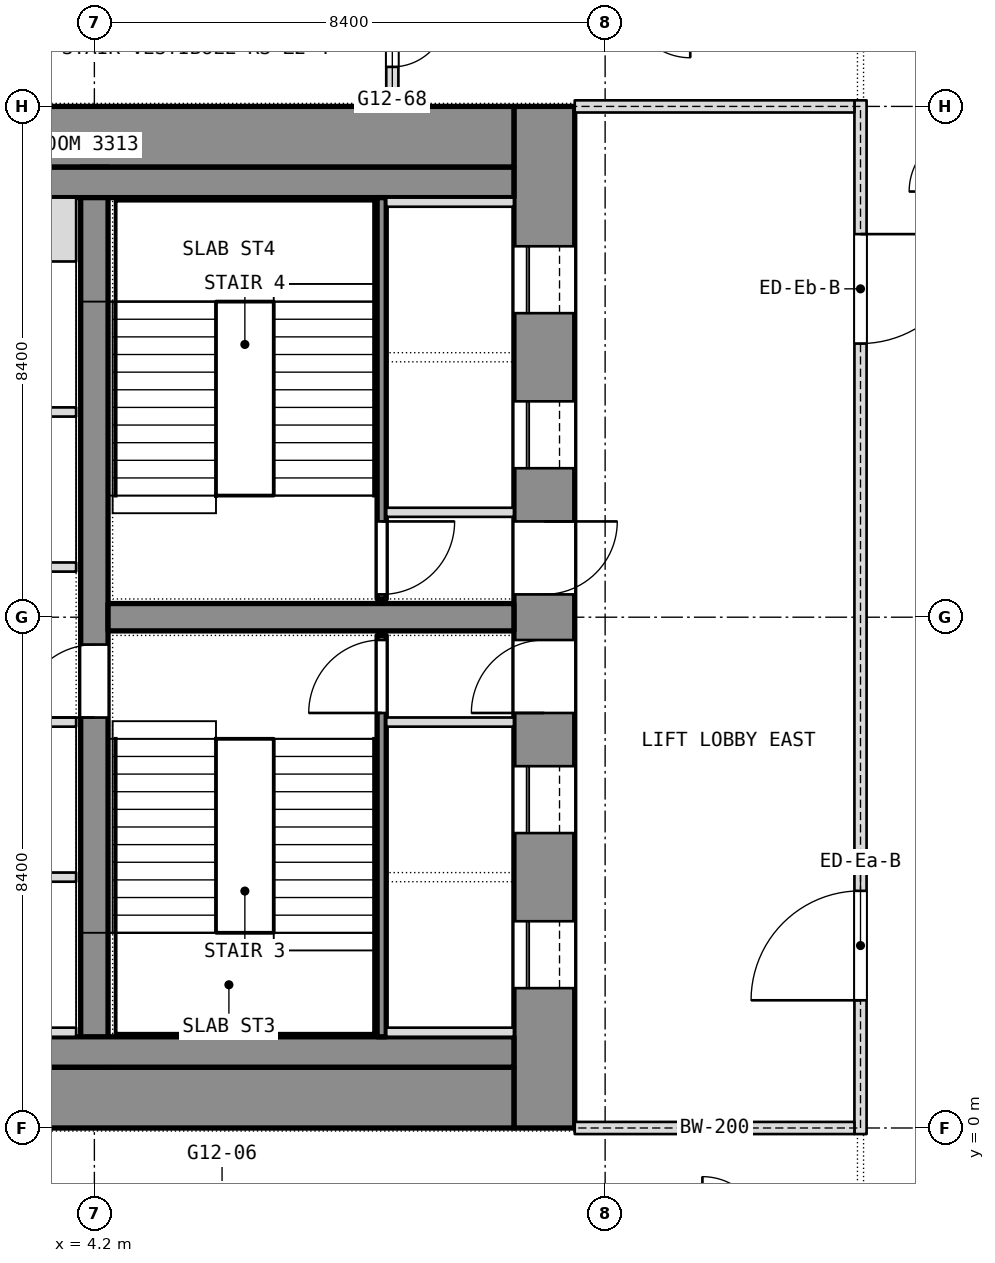
"""IFC4 building model, lengths in metres.
Left out: names, types, materials, properties, quantities, classifications, styles, units other than length and angle.
Written with IfcOpenShell. Run it as: python <this file> out.ifc"""

import sys

from ifc_helpers import new_model, si_unit, direction, frame, frame_2d, origin, place, context, subcontext, project, spatial, rectangle, extrude, element, fill, save


model = new_model("IFC4")
c1 = context("Model", 3, precision=1e-05, world=origin(), true_north=direction((0.0, 1.0)))
c2 = subcontext(c1, "Body", "Model", "MODEL_VIEW")
j1 = project(units=[si_unit("LENGTHUNIT", "METRE"), si_unit("PLANEANGLEUNIT", "RADIAN")], contexts=[c1])
p1 = place(None, origin())
s1 = spatial("IfcSite", under=j1, at=p1, CompositionType="ELEMENT")
p2 = place(p1, origin())
s2 = spatial("IfcBuilding", under=s1, at=p2, CompositionType="ELEMENT")
p3 = place(p2, frame((0.0, 0.0, 144.5)))
s3 = spatial("IfcBuildingStorey", under=s2, at=p3, CompositionType="ELEMENT", Elevation=144.5)
p4 = place(p3, frame((11.6, 0.0, 0.0), z_axis=(0.0, 0.0, 1.0), x_axis=(0.0, 1.0, 0.0)))
e1 = element("IfcWall", 1, at=p4, inside=s3, PredefinedType="SHEAR", context=c2, shape_type="SweptSolid", body=[
    extrude(rectangle(XDim=16.8, YDim=1.0, at=frame_2d((8.4, 0.0))), origin(), (0.0, 0.0, 1.0), 3.6),
])
p5 = place(p4, frame((2.3, 0.0, 0.0)))
e2 = element("IfcOpeningElement", 2, at=p5, cuts=e1, PredefinedType="OPENING", context=c2, shape_type="SweptSolid", body=[
    extrude(rectangle(XDim=1.1, YDim=2.1, at=frame_2d((0.55, 1.05))), frame((0.0, 0.5, 0.0), z_axis=(0.0, -1.0, 0.0), x_axis=(1.0, 0.0, 0.0)), (0.0, 0.0, 1.0), 1.0),
])
p6 = place(p4, frame((4.85, 0.0, 0.0)))
e3 = element("IfcOpeningElement", 3, at=p6, cuts=e1, PredefinedType="OPENING", context=c2, shape_type="SweptSolid", body=[
    extrude(rectangle(XDim=1.1, YDim=2.1, at=frame_2d((0.55, 1.05))), frame((0.0, 0.5, 0.0), z_axis=(0.0, -1.0, 0.0), x_axis=(1.0, 0.0, 0.0)), (0.0, 0.0, 1.0), 1.0),
])
p7 = place(p4, frame((6.825, 0.0, 0.0)))
e4 = element("IfcOpeningElement", 4, at=p7, cuts=e1, PredefinedType="OPENING", context=c2, shape_type="SweptSolid", body=[
    extrude(rectangle(XDim=1.2, YDim=2.1, at=frame_2d((0.6, 1.05))), frame((0.0, 0.5, 0.0), z_axis=(0.0, -1.0, 0.0), x_axis=(1.0, 0.0, 0.0)), (0.0, 0.0, 1.0), 1.0),
])
p8 = place(p4, frame((13.4, 0.0, 0.0)))
e5 = element("IfcOpeningElement", 5, at=p8, cuts=e1, PredefinedType="OPENING", context=c2, shape_type="SweptSolid", body=[
    extrude(rectangle(XDim=1.1, YDim=2.1, at=frame_2d((0.55, 1.05))), frame((0.0, 0.5, 0.0), z_axis=(0.0, -1.0, 0.0), x_axis=(1.0, 0.0, 0.0)), (0.0, 0.0, 1.0), 1.0),
])
p9 = place(p4, frame((10.85, 0.0, 0.0)))
e6 = element("IfcOpeningElement", 6, at=p9, cuts=e1, PredefinedType="OPENING", context=c2, shape_type="SweptSolid", body=[
    extrude(rectangle(XDim=1.1, YDim=2.1, at=frame_2d((0.55, 1.05))), frame((0.0, 0.5, 0.0), z_axis=(0.0, -1.0, 0.0), x_axis=(1.0, 0.0, 0.0)), (0.0, 0.0, 1.0), 1.0),
])
p10 = place(p4, frame((8.775, 0.0, 0.0)))
e7 = element("IfcOpeningElement", 7, at=p10, cuts=e1, PredefinedType="OPENING", context=c2, shape_type="SweptSolid", body=[
    extrude(rectangle(XDim=1.2, YDim=2.1, at=frame_2d((0.6, 1.05))), frame((0.0, 0.5, 0.0), z_axis=(0.0, -1.0, 0.0), x_axis=(1.0, 0.0, 0.0)), (0.0, 0.0, 1.0), 1.0),
])
for number, where, z_axis, x_axis in (
    (8, (-11.1, 0.5, 0.0), (0.0, 0.0, 1.0), (1.0, 0.0, 0.0)),
    (9, (-11.1, 16.3, 0.0), (0.0, 0.0, 1.0), (1.0, 0.0, 0.0)),
):
    element("IfcWall", number, at=place(p3, frame(where, z_axis=z_axis, x_axis=x_axis)), inside=s3, PredefinedType="SHEAR", context=c2, shape_type="SweptSolid", body=[
        extrude(rectangle(XDim=22.2, YDim=1.0, at=frame_2d((11.1, 0.0))), origin(), (0.0, 0.0, 1.0), 3.6),
    ])
p11 = place(p3, frame((4.2, 1.0, 0.0), z_axis=(0.0, 0.0, 1.0), x_axis=(0.0, 1.0, 0.0)))
e10 = element("IfcWall", 10, at=p11, inside=s3, PredefinedType="SHEAR", context=c2, shape_type="SweptSolid", body=[
    extrude(rectangle(XDim=14.8, YDim=0.45, at=frame_2d((7.4, 0.0))), origin(), (0.0, 0.0, 1.0), 3.6),
])
p12 = place(p11, frame((5.75, 0.0, 0.0)))
e11 = element("IfcOpeningElement", 11, at=p12, cuts=e10, PredefinedType="OPENING", context=c2, shape_type="SweptSolid", body=[
    extrude(rectangle(XDim=1.2, YDim=2.1, at=frame_2d((0.6, 1.05))), frame((0.0, 0.225, 0.0), z_axis=(0.0, -1.0, 0.0), x_axis=(1.0, 0.0, 0.0)), (0.0, 0.0, 1.0), 0.45),
])
p13 = place(p3, frame((4.425, 8.4, 0.0), z_axis=(0.0, 0.0, 1.0), x_axis=(1.0, 0.0, 0.0)))
e12 = element("IfcWall", 12, at=p13, inside=s3, PredefinedType="SHEAR", context=c2, shape_type="SweptSolid", body=[
    extrude(rectangle(XDim=6.675, YDim=0.45, at=frame_2d((3.337, 0.0))), origin(), (0.0, 0.0, 1.0), 3.6),
])
p14 = place(p3, frame((9.1, 16.9, 0.0), z_axis=(0.0, 0.0, 1.0), x_axis=(0.0, 1.0, 0.0)))
e13 = element("IfcWall", 13, at=p14, inside=s3, PredefinedType="PARTITIONING", context=c2, shape_type="SweptSolid", body=[
    extrude(rectangle(XDim=1.8, YDim=0.2, at=frame_2d((0.9, 0.0))), origin(), (0.0, 0.0, 1.0), 3.34),
])
p15 = place(p14, frame((0.55, 0.0, 0.0)))
e14 = element("IfcOpeningElement", 14, at=p15, cuts=e13, PredefinedType="OPENING", context=c2, shape_type="SweptSolid", body=[
    extrude(rectangle(XDim=0.9, YDim=2.1, at=frame_2d((0.45, 1.05))), frame((0.0, 0.1, 0.0), z_axis=(0.0, -1.0, 0.0), x_axis=(1.0, 0.0, 0.0)), (0.0, 0.0, 1.0), 0.2),
])
for number, where, z_axis, x_axis in (
    (15, (-11.1, 1.25, 0.0), (0.0, 0.0, 1.0), (1.0, 0.0, 0.0)),
    (16, (-11.1, 15.55, 0.0), (0.0, 0.0, 1.0), (1.0, 0.0, 0.0)),
):
    element("IfcWall", number, at=place(p3, frame(where, z_axis=z_axis, x_axis=x_axis)), inside=s3, PredefinedType="PARTITIONING", context=c2, shape_type="SweptSolid", body=[
        extrude(rectangle(XDim=22.2, YDim=0.5, at=frame_2d((11.1, 0.0))), origin(), (0.0, 0.0, 1.0), 3.34),
    ])
p16 = place(p3, frame((8.925, 1.5, 0.0), z_axis=(0.0, 0.0, 1.0), x_axis=(0.0, 1.0, 0.0)))
e17 = element("IfcWall", 17, at=p16, inside=s3, PredefinedType="SHEAR", context=c2, shape_type="SweptSolid", body=[
    extrude(rectangle(XDim=6.6, YDim=0.15, at=frame_2d((3.3, 0.0))), origin(), (0.0, 0.0, 1.0), 3.34),
])
p17 = place(p16, frame((5.325, 0.0, 0.0)))
e18 = element("IfcOpeningElement", 18, at=p17, cuts=e17, PredefinedType="OPENING", context=c2, shape_type="SweptSolid", body=[
    extrude(rectangle(XDim=1.2, YDim=2.1, at=frame_2d((0.6, 1.05))), frame((0.0, 0.075, 0.0), z_axis=(0.0, -1.0, 0.0), x_axis=(1.0, 0.0, 0.0)), (0.0, 0.0, 1.0), 0.15),
])
for number, where, z_axis, x_axis in (
    (19, (9.0, 6.675, 0.0), (0.0, 0.0, 1.0), (1.0, 0.0, 0.0)),
    (20, (9.0, 1.575, 0.0), (0.0, 0.0, 1.0), (1.0, 0.0, 0.0)),
):
    element("IfcWall", number, at=place(p3, frame(where, z_axis=z_axis, x_axis=x_axis)), inside=s3, PredefinedType="SHEAR", context=c2, shape_type="SweptSolid", body=[
        extrude(rectangle(XDim=2.1, YDim=0.15, at=frame_2d((1.05, 0.0))), origin(), (0.0, 0.0, 1.0), 3.6),
    ])
p18 = place(p3, frame((8.925, 8.7, 0.0), z_axis=(0.0, 0.0, 1.0), x_axis=(0.0, 1.0, 0.0)))
e21 = element("IfcWall", 21, at=p18, inside=s3, PredefinedType="SHEAR", context=c2, shape_type="SweptSolid", body=[
    extrude(rectangle(XDim=6.6, YDim=0.15, at=frame_2d((3.3, 0.0))), origin(), (0.0, 0.0, 1.0), 3.34),
])
p19 = place(p18, frame((0.075, 0.0, 0.0)))
e22 = element("IfcOpeningElement", 22, at=p19, cuts=e21, PredefinedType="OPENING", context=c2, shape_type="SweptSolid", body=[
    extrude(rectangle(XDim=1.2, YDim=2.1, at=frame_2d((0.6, 1.05))), frame((0.0, 0.075, 0.0), z_axis=(0.0, -1.0, 0.0), x_axis=(1.0, 0.0, 0.0)), (0.0, 0.0, 1.0), 0.15),
])
for number, where, z_axis, x_axis in (
    (23, (9.0, 10.125, 0.0), (0.0, 0.0, 1.0), (1.0, 0.0, 0.0)),
    (24, (9.0, 15.225, 0.0), (0.0, 0.0, 1.0), (1.0, 0.0, 0.0)),
):
    element("IfcWall", number, at=place(p3, frame(where, z_axis=z_axis, x_axis=x_axis)), inside=s3, PredefinedType="SHEAR", context=c2, shape_type="SweptSolid", body=[
        extrude(rectangle(XDim=2.1, YDim=0.15, at=frame_2d((1.05, 0.0))), origin(), (0.0, 0.0, 1.0), 3.6),
    ])
p20 = place(p3, frame((-3.9, 4.125, 0.0), z_axis=(0.0, 0.0, 1.0), x_axis=(1.0, 0.0, 0.0)))
e25 = element("IfcWall", 25, at=p20, inside=s3, PredefinedType="PARTITIONING", context=c2, shape_type="SweptSolid", body=[
    extrude(rectangle(XDim=7.8, YDim=0.15, at=frame_2d((3.9, 0.0))), origin(), (0.0, 0.0, 1.0), 3.34),
])
p21 = place(p20, frame((3.75, 0.0, 0.0)))
e26 = element("IfcOpeningElement", 26, at=p21, cuts=e25, PredefinedType="OPENING", context=c2, shape_type="SweptSolid", body=[
    extrude(rectangle(XDim=1.2, YDim=2.1, at=frame_2d((0.6, 1.05))), frame((0.0, 0.075, 0.0), z_axis=(0.0, -1.0, 0.0), x_axis=(1.0, 0.0, 0.0)), (0.0, 0.0, 1.0), 0.15),
])
p22 = place(p3, frame((-3.9, 11.775, 0.0), z_axis=(0.0, 0.0, 1.0), x_axis=(1.0, 0.0, 0.0)))
e27 = element("IfcWall", 27, at=p22, inside=s3, PredefinedType="PARTITIONING", context=c2, shape_type="SweptSolid", body=[
    extrude(rectangle(XDim=7.8, YDim=0.15, at=frame_2d((3.9, 0.0))), origin(), (0.0, 0.0, 1.0), 3.34),
])
p23 = place(p22, frame((3.3, 0.0, 0.0)))
e28 = element("IfcOpeningElement", 28, at=p23, cuts=e27, PredefinedType="OPENING", context=c2, shape_type="SweptSolid", body=[
    extrude(rectangle(XDim=1.2, YDim=2.1, at=frame_2d((0.6, 1.05))), frame((0.0, 0.075, 0.0), z_axis=(0.0, -1.0, 0.0), x_axis=(1.0, 0.0, 0.0)), (0.0, 0.0, 1.0), 0.15),
])
p24 = place(p3, frame((1.65, 1.575, 0.0), z_axis=(0.0, 0.0, 1.0), x_axis=(1.0, 0.0, 0.0)))
e29 = element("IfcWall", 29, at=p24, inside=s3, PredefinedType="SHEAR", context=c2, shape_type="SweptSolid", body=[
    extrude(rectangle(XDim=2.25, YDim=0.15, at=frame_2d((1.125, 0.0))), origin(), (0.0, 0.0, 1.0), 3.6),
])
p25 = place(p3, frame((1.65, 14.775, 0.0), z_axis=(0.0, 0.0, 1.0), x_axis=(1.0, 0.0, 0.0)))
e30 = element("IfcWall", 30, at=p25, inside=s3, PredefinedType="SHEAR", context=c2, shape_type="SweptSolid", body=[
    extrude(rectangle(XDim=2.25, YDim=1.05, at=frame_2d((1.125, 0.0))), origin(), (0.0, 0.0, 1.0), 3.6),
])
for number, where, z_axis, x_axis in (
    (31, (1.65, 6.675, 0.0), (0.0, 0.0, 1.0), (1.0, 0.0, 0.0)),
    (32, (1.65, 9.225, 0.0), (0.0, 0.0, 1.0), (1.0, 0.0, 0.0)),
):
    element("IfcWall", number, at=place(p3, frame(where, z_axis=z_axis, x_axis=x_axis)), inside=s3, PredefinedType="SHEAR", context=c2, shape_type="SweptSolid", body=[
        extrude(rectangle(XDim=2.25, YDim=0.15, at=frame_2d((1.125, 0.0))), origin(), (0.0, 0.0, 1.0), 3.6),
    ])
p26 = place(p3, frame((16.8, -0.1, 0.0), z_axis=(0.0, 0.0, 1.0), x_axis=(0.0, 1.0, 0.0)))
e33 = element("IfcWall", 33, at=p26, inside=s3, PredefinedType="PARTITIONING", context=c2, shape_type="SweptSolid", body=[
    extrude(rectangle(XDim=17.0, YDim=0.2, at=frame_2d((8.5, 0.0))), origin(), (0.0, 0.0, 1.0), 3.34),
])
p27 = place(p26, frame((2.2, 0.0, 0.0)))
e34 = element("IfcOpeningElement", 34, at=p27, cuts=e33, PredefinedType="OPENING", context=c2, shape_type="SweptSolid", body=[
    extrude(rectangle(XDim=1.8, YDim=2.1, at=frame_2d((0.9, 1.05))), frame((0.0, 0.1, 0.0), z_axis=(0.0, -1.0, 0.0), x_axis=(1.0, 0.0, 0.0)), (0.0, 0.0, 1.0), 0.2),
])
p28 = place(p26, frame((13.0, 0.0, 0.0)))
e35 = element("IfcOpeningElement", 35, at=p28, cuts=e33, PredefinedType="OPENING", context=c2, shape_type="SweptSolid", body=[
    extrude(rectangle(XDim=1.8, YDim=2.1, at=frame_2d((0.9, 1.05))), frame((0.0, 0.1, 0.0), z_axis=(0.0, -1.0, 0.0), x_axis=(1.0, 0.0, 0.0)), (0.0, 0.0, 1.0), 0.2),
])
for number, where, z_axis, x_axis in (
    (36, (12.1, 0.0, 0.0), (0.0, 0.0, 1.0), (1.0, 0.0, 0.0)),
    (37, (12.1, 16.8, 0.0), (0.0, 0.0, 1.0), (1.0, 0.0, 0.0)),
):
    element("IfcWall", number, at=place(p3, frame(where, z_axis=z_axis, x_axis=x_axis)), inside=s3, PredefinedType="PARTITIONING", context=c2, shape_type="SweptSolid", body=[
        extrude(rectangle(XDim=4.6, YDim=0.2, at=frame_2d((2.3, 0.0))), origin(), (0.0, 0.0, 1.0), 2.89),
    ])
p29 = place(p15, origin())
e38 = element("IfcDoor", 38, at=p29, inside=s3, OperationType="SINGLE_SWING_RIGHT", PredefinedType="DOOR", context=c2, shape_type="SweptSolid", body=[
    extrude(rectangle(XDim=0.9, YDim=2.1, at=frame_2d((0.45, 1.05))), frame((0.0, 0.025, 0.0), z_axis=(0.0, -1.0, 0.0), x_axis=(1.0, 0.0, 0.0)), (0.0, 0.0, 1.0), 0.05),
])
fill(e14, e38)
p30 = place(p5, origin())
e39 = element("IfcDoor", 39, at=p30, inside=s3, OperationType="SLIDING_TO_LEFT", PredefinedType="DOOR", context=c2, shape_type="SweptSolid", body=[
    extrude(rectangle(XDim=1.1, YDim=2.1, at=frame_2d((0.55, 1.05))), frame((0.0, 0.025, 0.0), z_axis=(0.0, -1.0, 0.0), x_axis=(1.0, 0.0, 0.0)), (0.0, 0.0, 1.0), 0.05),
])
fill(e2, e39)
p31 = place(p6, origin())
e40 = element("IfcDoor", 40, at=p31, inside=s3, OperationType="SLIDING_TO_LEFT", PredefinedType="DOOR", context=c2, shape_type="SweptSolid", body=[
    extrude(rectangle(XDim=1.1, YDim=2.1, at=frame_2d((0.55, 1.05))), frame((0.0, 0.025, 0.0), z_axis=(0.0, -1.0, 0.0), x_axis=(1.0, 0.0, 0.0)), (0.0, 0.0, 1.0), 0.05),
])
fill(e3, e40)
p32 = place(p7, origin())
e41 = element("IfcDoor", 41, at=p32, inside=s3, OperationType="SINGLE_SWING_LEFT", PredefinedType="DOOR", context=c2, shape_type="SweptSolid", body=[
    extrude(rectangle(XDim=1.2, YDim=2.1, at=frame_2d((0.6, 1.05))), frame((0.0, 0.025, 0.0), z_axis=(0.0, -1.0, 0.0), x_axis=(1.0, 0.0, 0.0)), (0.0, 0.0, 1.0), 0.05),
])
fill(e4, e41)
p33 = place(p17, origin())
e42 = element("IfcDoor", 42, at=p33, inside=s3, OperationType="SINGLE_SWING_LEFT", PredefinedType="DOOR", context=c2, shape_type="SweptSolid", body=[
    extrude(rectangle(XDim=1.2, YDim=2.1, at=frame_2d((0.6, 1.05))), frame((0.0, 0.025, 0.0), z_axis=(0.0, -1.0, 0.0), x_axis=(1.0, 0.0, 0.0)), (0.0, 0.0, 1.0), 0.05),
])
fill(e18, e42)
p34 = place(p8, origin())
e43 = element("IfcDoor", 43, at=p34, inside=s3, OperationType="SLIDING_TO_LEFT", PredefinedType="DOOR", context=c2, shape_type="SweptSolid", body=[
    extrude(rectangle(XDim=1.1, YDim=2.1, at=frame_2d((0.55, 1.05))), frame((0.0, 0.025, 0.0), z_axis=(0.0, -1.0, 0.0), x_axis=(1.0, 0.0, 0.0)), (0.0, 0.0, 1.0), 0.05),
])
fill(e5, e43)
p35 = place(p9, origin())
e44 = element("IfcDoor", 44, at=p35, inside=s3, OperationType="SLIDING_TO_LEFT", PredefinedType="DOOR", context=c2, shape_type="SweptSolid", body=[
    extrude(rectangle(XDim=1.1, YDim=2.1, at=frame_2d((0.55, 1.05))), frame((0.0, 0.025, 0.0), z_axis=(0.0, -1.0, 0.0), x_axis=(1.0, 0.0, 0.0)), (0.0, 0.0, 1.0), 0.05),
])
fill(e6, e44)
p36 = place(p10, origin())
e45 = element("IfcDoor", 45, at=p36, inside=s3, OperationType="SINGLE_SWING_LEFT", PredefinedType="DOOR", context=c2, shape_type="SweptSolid", body=[
    extrude(rectangle(XDim=1.2, YDim=2.1, at=frame_2d((0.6, 1.05))), frame((0.0, 0.025, 0.0), z_axis=(0.0, -1.0, 0.0), x_axis=(1.0, 0.0, 0.0)), (0.0, 0.0, 1.0), 0.05),
])
fill(e7, e45)
p37 = place(p19, origin())
e46 = element("IfcDoor", 46, at=p37, inside=s3, OperationType="SINGLE_SWING_LEFT", PredefinedType="DOOR", context=c2, shape_type="SweptSolid", body=[
    extrude(rectangle(XDim=1.2, YDim=2.1, at=frame_2d((0.6, 1.05))), frame((0.0, 0.025, 0.0), z_axis=(0.0, -1.0, 0.0), x_axis=(1.0, 0.0, 0.0)), (0.0, 0.0, 1.0), 0.05),
])
fill(e22, e46)
p38 = place(p12, origin())
e47 = element("IfcDoor", 47, at=p38, inside=s3, OperationType="SINGLE_SWING_LEFT", PredefinedType="DOOR", context=c2, shape_type="SweptSolid", body=[
    extrude(rectangle(XDim=1.2, YDim=2.1, at=frame_2d((0.6, 1.05))), frame((0.0, 0.025, 0.0), z_axis=(0.0, -1.0, 0.0), x_axis=(1.0, 0.0, 0.0)), (0.0, 0.0, 1.0), 0.05),
])
fill(e11, e47)
p39 = place(p27, origin())
e48 = element("IfcDoor", 48, at=p39, inside=s3, OperationType="DOUBLE_DOOR_SINGLE_SWING", PredefinedType="DOOR", context=c2, shape_type="SweptSolid", body=[
    extrude(rectangle(XDim=1.8, YDim=2.1, at=frame_2d((0.9, 1.05))), frame((0.0, 0.025, 0.0), z_axis=(0.0, -1.0, 0.0), x_axis=(1.0, 0.0, 0.0)), (0.0, 0.0, 1.0), 0.05),
])
fill(e34, e48)
p40 = place(p28, origin())
e49 = element("IfcDoor", 49, at=p40, inside=s3, OperationType="DOUBLE_DOOR_SINGLE_SWING", PredefinedType="DOOR", context=c2, shape_type="SweptSolid", body=[
    extrude(rectangle(XDim=1.8, YDim=2.1, at=frame_2d((0.9, 1.05))), frame((0.0, 0.025, 0.0), z_axis=(0.0, -1.0, 0.0), x_axis=(1.0, 0.0, 0.0)), (0.0, 0.0, 1.0), 0.05),
])
fill(e35, e49)
save(model, sys.argv[1])
